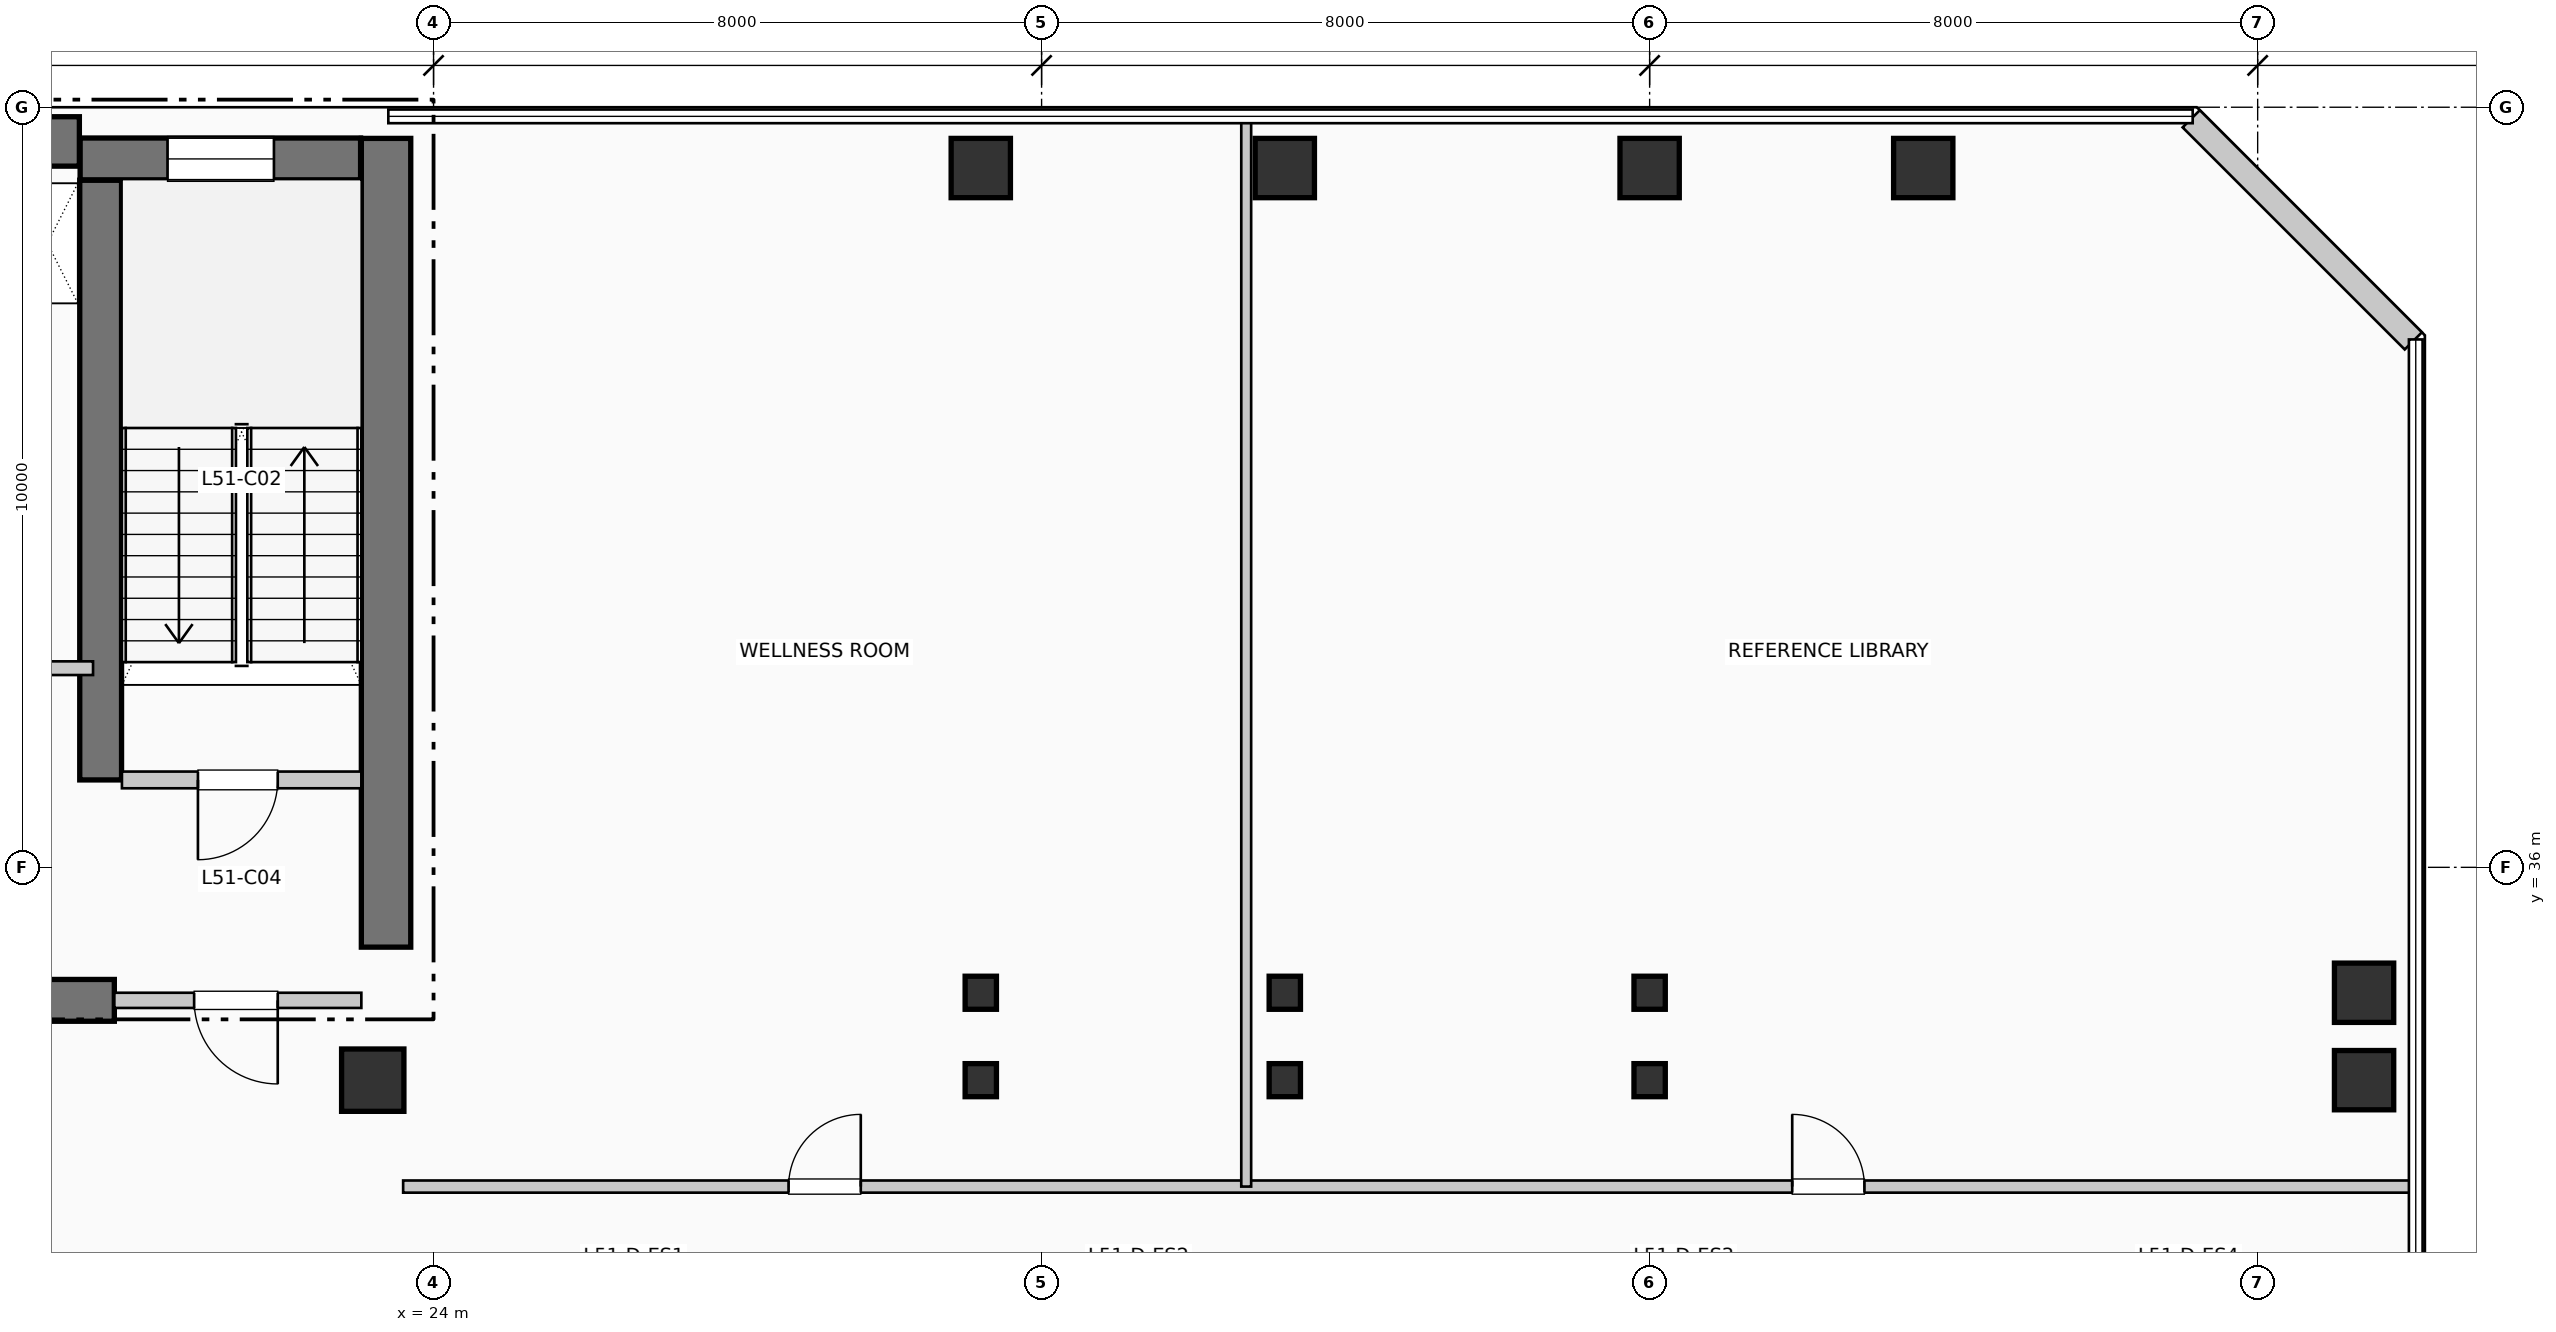
"""IFC4 building model, lengths in metres.
Left out: names, types, materials, properties, quantities, classifications, styles, units other than length and angle.
Written with IfcOpenShell. Run it as: python <this file> out.ifc"""

import sys

from ifc_helpers import new_model, si_unit, direction, frame, frame_2d, origin, origin_2d, place, context, subcontext, project, spatial, rectangle, i_section, extrude, element, fill, save


model = new_model("IFC4")
c1 = context("Model", 3, precision=1e-05, world=origin(), true_north=direction((0.0, 1.0)))
c2 = subcontext(c1, "Body", "Model", "MODEL_VIEW")
j1 = project(units=[si_unit("LENGTHUNIT", "METRE"), si_unit("PLANEANGLEUNIT", "RADIAN")], contexts=[c1])
p1 = place(None, origin())
s1 = spatial("IfcSite", under=j1, at=p1, CompositionType="ELEMENT")
p2 = place(p1, origin())
s2 = spatial("IfcBuilding", under=s1, at=p2, CompositionType="ELEMENT")
p3 = place(p2, frame((0.0, 0.0, 211.2)))
s3 = spatial("IfcBuildingStorey", under=s2, at=p3, CompositionType="ELEMENT", Elevation=211.2)
p4 = place(p3, frame((5.36, 45.55, 0.0), z_axis=(0.0, 0.0, 1.0), x_axis=(1.0, 0.0, 0.0)))
e1 = element("IfcWall", 1, at=p4, inside=s3, PredefinedType="SHEAR", context=c2, shape_type="SweptSolid", body=[
    extrude(rectangle(XDim=13.98, YDim=0.65, at=frame_2d((6.99, 0.0))), origin(), (0.0, 0.0, 1.0), 3.96),
])
p5 = place(p3, frame((23.375, 34.95, 0.0), z_axis=(0.0, 0.0, 1.0), x_axis=(0.0, 1.0, 0.0)))
e2 = element("IfcWall", 2, at=p5, inside=s3, PredefinedType="SHEAR", context=c2, shape_type="SweptSolid", body=[
    extrude(rectangle(XDim=10.64, YDim=0.65, at=frame_2d((5.32, 0.0))), origin(), (0.0, 0.0, 1.0), 3.96),
])
p6 = place(p3, frame((13.68, 34.25, 0.0), z_axis=(0.0, 0.0, 1.0), x_axis=(1.0, 0.0, 0.0)))
e3 = element("IfcWall", 3, at=p6, inside=s3, PredefinedType="SHEAR", context=c2, shape_type="SweptSolid", body=[
    extrude(rectangle(XDim=6.12, YDim=0.55, at=frame_2d((3.06, 0.0))), origin(), (0.0, 0.0, 1.0), 3.96),
])
p7 = place(p3, frame((19.62, 37.15, 0.0), z_axis=(0.0, 0.0, 1.0), x_axis=(0.0, 1.0, 0.0)))
e4 = element("IfcWall", 4, at=p7, inside=s3, PredefinedType="SHEAR", context=c2, shape_type="SweptSolid", body=[
    extrude(rectangle(XDim=7.89, YDim=0.55, at=frame_2d((3.945, 0.0))), origin(), (0.0, 0.0, 1.0), 3.96),
])
p8 = place(p3, frame((19.35, 45.32, 0.0), z_axis=(0.0, 0.0, 1.0), x_axis=(1.0, 0.0, 0.0)))
e5 = element("IfcWall", 5, at=p8, inside=s3, PredefinedType="SHEAR", context=c2, shape_type="SweptSolid", body=[
    extrude(rectangle(XDim=3.69, YDim=0.55, at=frame_2d((1.845, 0.0))), origin(), (0.0, 0.0, 1.0), 3.96),
])
p9 = place(p8, frame((1.15, 0.0, 1.05)))
e6 = element("IfcOpeningElement", 6, at=p9, cuts=e5, PredefinedType="OPENING", context=c2, shape_type="SweptSolid", body=[
    extrude(rectangle(XDim=1.4, YDim=1.8, at=frame_2d((0.7, 0.9))), frame((0.0, 0.285, 0.0), z_axis=(0.0, -1.0, 0.0), x_axis=(1.0, 0.0, 0.0)), (0.0, 0.0, 1.0), 0.57),
])
p10 = place(p3, frame((23.2, 33.2, 0.0), z_axis=(0.0, 0.0, 1.0), x_axis=(1.0, 0.0, 0.0)))
e7 = element("IfcColumn", 7, at=p10, inside=s3, PredefinedType="COLUMN", context=c2, shape_type="SweptSolid", body=[
    extrude(rectangle(XDim=0.82, YDim=0.82, at=origin_2d()), origin(), (0.0, 0.0, 1.0), 3.96),
])
for number, where, z_axis, x_axis in (
    (8, (31.2, 33.2, 0.0), (0.0, 0.0, 1.0), (1.0, 0.0, 0.0)),
    (9, (31.2, 34.35, 0.0), (0.0, 0.0, 1.0), (1.0, 0.0, 0.0)),
):
    element("IfcColumn", number, at=place(p3, frame(where, z_axis=z_axis, x_axis=x_axis)), inside=s3, PredefinedType="COLUMN", context=c2, shape_type="SweptSolid", body=[
        extrude(i_section(OverallWidth=0.412, OverallDepth=0.435, WebThickness=0.027, FlangeThickness=0.043, at=origin_2d()), origin(), (0.0, 0.0, 1.0), 3.96),
    ])
p11 = place(p3, frame((31.2, 45.2, 0.0), z_axis=(0.0, 0.0, 1.0), x_axis=(1.0, 0.0, 0.0)))
e10 = element("IfcColumn", 10, at=p11, inside=s3, PredefinedType="COLUMN", context=c2, shape_type="SweptSolid", body=[
    extrude(rectangle(XDim=0.78, YDim=0.78, at=origin_2d()), origin(), (0.0, 0.0, 1.0), 3.96),
])
for number, where, z_axis, x_axis in (
    (11, (35.2, 33.2, 0.0), (0.0, 0.0, 1.0), (1.0, 0.0, 0.0)),
    (12, (35.2, 34.35, 0.0), (0.0, 0.0, 1.0), (1.0, 0.0, 0.0)),
):
    element("IfcColumn", number, at=place(p3, frame(where, z_axis=z_axis, x_axis=x_axis)), inside=s3, PredefinedType="COLUMN", context=c2, shape_type="SweptSolid", body=[
        extrude(i_section(OverallWidth=0.412, OverallDepth=0.435, WebThickness=0.027, FlangeThickness=0.043, at=origin_2d()), origin(), (0.0, 0.0, 1.0), 3.96),
    ])
p12 = place(p3, frame((35.2, 45.2, 0.0), z_axis=(0.0, 0.0, 1.0), x_axis=(1.0, 0.0, 0.0)))
e13 = element("IfcColumn", 13, at=p12, inside=s3, PredefinedType="COLUMN", context=c2, shape_type="SweptSolid", body=[
    extrude(rectangle(XDim=0.78, YDim=0.78, at=origin_2d()), origin(), (0.0, 0.0, 1.0), 3.96),
])
for number, where, z_axis, x_axis in (
    (14, (40.0, 33.2, 0.0), (0.0, 0.0, 1.0), (1.0, 0.0, 0.0)),
    (15, (40.0, 34.35, 0.0), (0.0, 0.0, 1.0), (1.0, 0.0, 0.0)),
):
    element("IfcColumn", number, at=place(p3, frame(where, z_axis=z_axis, x_axis=x_axis)), inside=s3, PredefinedType="COLUMN", context=c2, shape_type="SweptSolid", body=[
        extrude(i_section(OverallWidth=0.412, OverallDepth=0.435, WebThickness=0.027, FlangeThickness=0.043, at=origin_2d()), origin(), (0.0, 0.0, 1.0), 3.96),
    ])
for number, where, z_axis, x_axis in (
    (16, (40.0, 45.2, 0.0), (0.0, 0.0, 1.0), (1.0, 0.0, 0.0)),
    (17, (43.6, 45.2, 0.0), (0.0, 0.0, 1.0), (1.0, 0.0, 0.0)),
    (18, (49.4, 33.2, 0.0), (0.0, 0.0, 1.0), (1.0, 0.0, 0.0)),
    (19, (49.4, 34.35, 0.0), (0.0, 0.0, 1.0), (1.0, 0.0, 0.0)),
):
    element("IfcColumn", number, at=place(p3, frame(where, z_axis=z_axis, x_axis=x_axis)), inside=s3, PredefinedType="COLUMN", context=c2, shape_type="SweptSolid", body=[
        extrude(rectangle(XDim=0.78, YDim=0.78, at=origin_2d()), origin(), (0.0, 0.0, 1.0), 3.96),
    ])
p13 = place(p3, frame((50.048, 42.926, 0.0), z_axis=(0.0, 0.0, 1.0), x_axis=(-0.707136318428, 0.707077242712, 0.0)))
e20 = element("IfcWall", 20, at=p13, inside=s3, PredefinedType="SOLIDWALL", context=c2, shape_type="SweptSolid", body=[
    extrude(rectangle(XDim=4.133, YDim=0.32, at=frame_2d((2.066, 0.0))), origin(), (0.0, 0.0, 1.0), 3.71),
])
p14 = place(p3, frame((19.9, 37.15, 0.0), z_axis=(0.0, 0.0, 1.0), x_axis=(1.0, 0.0, 0.0)))
e21 = element("IfcWall", 21, at=p14, inside=s3, PredefinedType="PARTITIONING", context=c2, shape_type="SweptSolid", body=[
    extrude(rectangle(XDim=3.15, YDim=0.22, at=frame_2d((1.575, 0.0))), origin(), (0.0, 0.0, 1.0), 3.71),
])
p15 = place(p14, frame((2.05, 0.0, 0.0), z_axis=(0.0, 0.0, 1.0), x_axis=(-1.0, 0.0, 0.0)))
e22 = element("IfcOpeningElement", 22, at=p15, cuts=e21, PredefinedType="OPENING", context=c2, shape_type="SweptSolid", body=[
    extrude(rectangle(XDim=1.05, YDim=2.15, at=frame_2d((0.525, 1.075))), frame((0.0, 0.12, 0.0), z_axis=(0.0, -1.0, 0.0), x_axis=(1.0, 0.0, 0.0)), (0.0, 0.0, 1.0), 0.24),
])
p16 = place(p3, frame((19.8, 34.25, 0.0), z_axis=(0.0, 0.0, 1.0), x_axis=(1.0, 0.0, 0.0)))
e23 = element("IfcWall", 23, at=p16, inside=s3, PredefinedType="PARTITIONING", context=c2, shape_type="SweptSolid", body=[
    extrude(rectangle(XDim=3.25, YDim=0.2, at=frame_2d((1.625, 0.0))), origin(), (0.0, 0.0, 1.0), 3.71),
])
p17 = place(p16, frame((2.15, 0.0, 0.0), z_axis=(0.0, 0.0, 1.0), x_axis=(-1.0, 0.0, 0.0)))
e24 = element("IfcOpeningElement", 24, at=p17, cuts=e23, PredefinedType="OPENING", context=c2, shape_type="SweptSolid", body=[
    extrude(rectangle(XDim=1.1, YDim=2.15, at=frame_2d((0.55, 1.075))), frame((0.0, 0.11, 0.0), z_axis=(0.0, -1.0, 0.0), x_axis=(1.0, 0.0, 0.0)), (0.0, 0.0, 1.0), 0.22),
])
p18 = place(p3, frame((17.68, 38.62, 0.0), z_axis=(0.0, 0.0, 1.0), x_axis=(1.0, 0.0, 0.0)))
e25 = element("IfcWall", 25, at=p18, inside=s3, PredefinedType="PARTITIONING", context=c2, shape_type="SweptSolid", body=[
    extrude(rectangle(XDim=1.84, YDim=0.18, at=frame_2d((0.92, 0.0))), origin(), (0.0, 0.0, 1.0), 3.71),
])
p19 = place(p18, frame((0.24, 0.0, 0.0)))
e26 = element("IfcOpeningElement", 26, at=p19, cuts=e25, PredefinedType="OPENING", context=c2, shape_type="SweptSolid", body=[
    extrude(rectangle(XDim=0.92, YDim=2.1, at=frame_2d((0.46, 1.05))), frame((0.0, 0.1, 0.0), z_axis=(0.0, -1.0, 0.0), x_axis=(1.0, 0.0, 0.0)), (0.0, 0.0, 1.0), 0.2),
])
p20 = place(p3, frame((23.6, 31.8, 0.0), z_axis=(0.0, 0.0, 1.0), x_axis=(1.0, 0.0, 0.0)))
e27 = element("IfcWall", 27, at=p20, inside=s3, PredefinedType="PARTITIONING", context=c2, shape_type="SweptSolid", body=[
    extrude(rectangle(XDim=26.41, YDim=0.16, at=frame_2d((13.205, 0.0))), origin(), (0.0, 0.0, 1.0), 3.71),
])
p21 = place(p20, frame((5.071, 0.0, 0.0)))
e28 = element("IfcOpeningElement", 28, at=p21, cuts=e27, PredefinedType="OPENING", context=c2, shape_type="SweptSolid", body=[
    extrude(rectangle(XDim=0.95, YDim=2.15, at=frame_2d((0.475, 1.075))), frame((0.0, 0.09, 0.0), z_axis=(0.0, -1.0, 0.0), x_axis=(1.0, 0.0, 0.0)), (0.0, 0.0, 1.0), 0.18),
])
p22 = place(p20, frame((18.276, 0.0, 0.0)))
e29 = element("IfcOpeningElement", 29, at=p22, cuts=e27, PredefinedType="OPENING", context=c2, shape_type="SweptSolid", body=[
    extrude(rectangle(XDim=0.95, YDim=2.15, at=frame_2d((0.475, 1.075))), frame((0.0, 0.09, 0.0), z_axis=(0.0, -1.0, 0.0), x_axis=(1.0, 0.0, 0.0)), (0.0, 0.0, 1.0), 0.18),
])
p23 = place(p3, frame((34.692, 31.8, 0.0), z_axis=(0.0, 0.0, 1.0), x_axis=(0.0, 1.0, 0.0)))
e30 = element("IfcWall", 30, at=p23, inside=s3, PredefinedType="PARTITIONING", context=c2, shape_type="SweptSolid", body=[
    extrude(rectangle(XDim=14.01, YDim=0.13, at=frame_2d((7.005, 0.0))), origin(), (0.0, 0.0, 1.0), 3.71),
])
p24 = place(p9, origin())
e31 = element("IfcWindow", 31, at=p24, inside=s3, PartitioningType="SINGLE_PANEL", PredefinedType="WINDOW", context=c2, shape_type="SweptSolid", body=[
    extrude(rectangle(XDim=1.4, YDim=1.8, at=frame_2d((0.7, 0.9))), frame((0.0, 0.03, 0.0), z_axis=(0.0, -1.0, 0.0), x_axis=(1.0, 0.0, 0.0)), (0.0, 0.0, 1.0), 0.06),
])
fill(e6, e31)
p25 = place(p15, origin())
e32 = element("IfcDoor", 32, at=p25, inside=s3, OperationType="SINGLE_SWING_LEFT", PredefinedType="DOOR", context=c2, shape_type="SweptSolid", body=[
    extrude(rectangle(XDim=1.05, YDim=2.15, at=frame_2d((0.525, 1.075))), frame((0.0, 0.025, 0.0), z_axis=(0.0, -1.0, 0.0), x_axis=(1.0, 0.0, 0.0)), (0.0, 0.0, 1.0), 0.05),
])
fill(e22, e32)
p26 = place(p17, origin())
e33 = element("IfcDoor", 33, at=p26, inside=s3, OperationType="SINGLE_SWING_RIGHT", PredefinedType="DOOR", context=c2, shape_type="SweptSolid", body=[
    extrude(rectangle(XDim=1.1, YDim=2.15, at=frame_2d((0.55, 1.075))), frame((0.0, 0.025, 0.0), z_axis=(0.0, -1.0, 0.0), x_axis=(1.0, 0.0, 0.0)), (0.0, 0.0, 1.0), 0.05),
])
fill(e24, e33)
p27 = place(p21, origin())
e34 = element("IfcDoor", 34, at=p27, inside=s3, OperationType="SINGLE_SWING_RIGHT", PredefinedType="DOOR", context=c2, shape_type="SweptSolid", body=[
    extrude(rectangle(XDim=0.95, YDim=2.15, at=frame_2d((0.475, 1.075))), frame((0.0, 0.025, 0.0), z_axis=(0.0, -1.0, 0.0), x_axis=(1.0, 0.0, 0.0)), (0.0, 0.0, 1.0), 0.05),
])
fill(e28, e34)
p28 = place(p22, origin())
e35 = element("IfcDoor", 35, at=p28, inside=s3, OperationType="SINGLE_SWING_LEFT", PredefinedType="DOOR", context=c2, shape_type="SweptSolid", body=[
    extrude(rectangle(XDim=0.95, YDim=2.15, at=frame_2d((0.475, 1.075))), frame((0.0, 0.025, 0.0), z_axis=(0.0, -1.0, 0.0), x_axis=(1.0, 0.0, 0.0)), (0.0, 0.0, 1.0), 0.05),
])
fill(e29, e35)
save(model, sys.argv[1])
